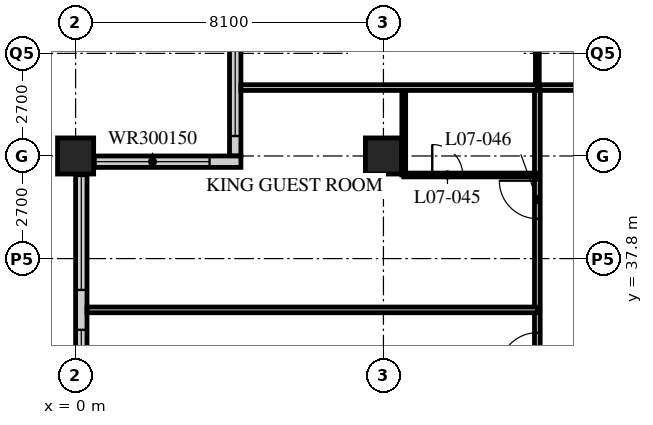
"""IFC4 building model, lengths in metres.
Left out: names, types, materials, properties, quantities, classifications, styles, units other than length and angle.
Written with IfcOpenShell. Run it as: python <this file> out.ifc"""

import sys

from ifc_helpers import new_model, si_unit, direction, frame, frame_2d, origin, origin_2d, place, context, subcontext, project, spatial, rectangle, hollow_rectangle, extrude, element, fill, save


model = new_model("IFC4")
c1 = context("Model", 3, precision=1e-05, world=origin(), true_north=direction((0.0, 1.0)))
c2 = subcontext(c1, "Body", "Model", "MODEL_VIEW")
j1 = project(units=[si_unit("LENGTHUNIT", "METRE"), si_unit("PLANEANGLEUNIT", "RADIAN")], contexts=[c1])
p1 = place(None, origin())
s1 = spatial("IfcSite", under=j1, at=p1, CompositionType="ELEMENT")
p2 = place(p1, origin())
s2 = spatial("IfcBuilding", under=s1, at=p2, CompositionType="ELEMENT")
p3 = place(p2, frame((0.0, 0.0, 36.4)))
s3 = spatial("IfcBuildingStorey", under=s2, at=p3, CompositionType="ELEMENT", Elevation=36.4)
for number, where, z_axis, x_axis in (
    (1, (0.0, 40.5, 0.0), (0.0, 0.0, 1.0), (1.0, 0.0, 0.0)),
    (2, (8.1, 40.5, 0.0), (0.0, 0.0, 1.0), (1.0, 0.0, 0.0)),
):
    element("IfcColumn", number, at=place(p3, frame(where, z_axis=z_axis, x_axis=x_axis)), inside=s3, PredefinedType="COLUMN", context=c2, shape_type="SweptSolid", body=[
        extrude(hollow_rectangle(XDim=0.95, YDim=0.95, WallThickness=0.095, at=origin_2d()), origin(), (0.0, 0.0, 1.0), 3.4),
    ])
p4 = place(p3, frame((4.2, 44.25, 0.0), z_axis=(0.0, 0.0, 1.0), x_axis=(0.0, -1.0, 0.0)))
e3 = element("IfcWall", 3, at=p4, inside=s3, PredefinedType="SOLIDWALL", context=c2, shape_type="SweptSolid", body=[
    extrude(rectangle(XDim=3.75, YDim=0.3, at=frame_2d((1.875, 0.0))), origin(), (0.0, 0.0, 1.0), 3.19),
])
p5 = place(p4, frame((0.225, 0.0, 0.9)))
e4 = element("IfcOpeningElement", 4, at=p5, cuts=e3, PredefinedType="OPENING", context=c2, shape_type="SweptSolid", body=[
    extrude(rectangle(XDim=3.0, YDim=1.5, at=frame_2d((1.5, 0.75))), frame((0.0, 0.16, 0.0), z_axis=(0.0, -1.0, 0.0), x_axis=(1.0, 0.0, 0.0)), (0.0, 0.0, 1.0), 0.32),
])
p6 = place(p3, frame((4.35, 40.35, 0.0), z_axis=(0.0, 0.0, 1.0), x_axis=(-1.0, 0.0, 0.0)))
e5 = element("IfcWall", 5, at=p6, inside=s3, PredefinedType="SOLIDWALL", context=c2, shape_type="SweptSolid", body=[
    extrude(rectangle(XDim=4.35, YDim=0.3, at=frame_2d((2.175, 0.0))), origin(), (0.0, 0.0, 1.0), 3.19),
])
p7 = place(p6, frame((0.825, 0.0, 0.9)))
e6 = element("IfcOpeningElement", 6, at=p7, cuts=e5, PredefinedType="OPENING", context=c2, shape_type="SweptSolid", body=[
    extrude(rectangle(XDim=3.0, YDim=1.5, at=frame_2d((1.5, 0.75))), frame((0.0, 0.16, 0.0), z_axis=(0.0, -1.0, 0.0), x_axis=(1.0, 0.0, 0.0)), (0.0, 0.0, 1.0), 0.32),
])
p8 = place(p3, frame((0.15, 40.2, 0.0), z_axis=(0.0, 0.0, 1.0), x_axis=(0.0, -1.0, 0.0)))
e7 = element("IfcWall", 7, at=p8, inside=s3, PredefinedType="SOLIDWALL", context=c2, shape_type="SweptSolid", body=[
    extrude(rectangle(XDim=32.1, YDim=0.3, at=frame_2d((16.05, 0.0))), origin(), (0.0, 0.0, 1.0), 3.19),
])
p9 = place(p8, frame((0.225, 0.0, 0.9)))
e8 = element("IfcOpeningElement", 8, at=p9, cuts=e7, PredefinedType="OPENING", context=c2, shape_type="SweptSolid", body=[
    extrude(rectangle(XDim=3.0, YDim=2.0, at=frame_2d((1.5, 1.0))), frame((0.0, 0.16, 0.0), z_axis=(0.0, -1.0, 0.0), x_axis=(1.0, 0.0, 0.0)), (0.0, 0.0, 1.0), 0.32),
])
p10 = place(p8, frame((4.275, 0.0, 0.9)))
e9 = element("IfcOpeningElement", 9, at=p10, cuts=e7, PredefinedType="OPENING", context=c2, shape_type="SweptSolid", body=[
    extrude(rectangle(XDim=3.0, YDim=2.0, at=frame_2d((1.5, 1.0))), frame((0.0, 0.16, 0.0), z_axis=(0.0, -1.0, 0.0), x_axis=(1.0, 0.0, 0.0)), (0.0, 0.0, 1.0), 0.32),
])
p11 = place(p8, frame((8.325, 0.0, 0.9)))
e10 = element("IfcOpeningElement", 10, at=p11, cuts=e7, PredefinedType="OPENING", context=c2, shape_type="SweptSolid", body=[
    extrude(rectangle(XDim=3.0, YDim=2.0, at=frame_2d((1.5, 1.0))), frame((0.0, 0.16, 0.0), z_axis=(0.0, -1.0, 0.0), x_axis=(1.0, 0.0, 0.0)), (0.0, 0.0, 1.0), 0.32),
])
p12 = place(p8, frame((12.375, 0.0, 0.9)))
e11 = element("IfcOpeningElement", 11, at=p12, cuts=e7, PredefinedType="OPENING", context=c2, shape_type="SweptSolid", body=[
    extrude(rectangle(XDim=3.0, YDim=2.0, at=frame_2d((1.5, 1.0))), frame((0.0, 0.16, 0.0), z_axis=(0.0, -1.0, 0.0), x_axis=(1.0, 0.0, 0.0)), (0.0, 0.0, 1.0), 0.32),
])
p13 = place(p8, frame((16.425, 0.0, 0.9)))
e12 = element("IfcOpeningElement", 12, at=p13, cuts=e7, PredefinedType="OPENING", context=c2, shape_type="SweptSolid", body=[
    extrude(rectangle(XDim=3.0, YDim=2.0, at=frame_2d((1.5, 1.0))), frame((0.0, 0.16, 0.0), z_axis=(0.0, -1.0, 0.0), x_axis=(1.0, 0.0, 0.0)), (0.0, 0.0, 1.0), 0.32),
])
p14 = place(p8, frame((20.475, 0.0, 0.9)))
e13 = element("IfcOpeningElement", 13, at=p14, cuts=e7, PredefinedType="OPENING", context=c2, shape_type="SweptSolid", body=[
    extrude(rectangle(XDim=3.0, YDim=2.0, at=frame_2d((1.5, 1.0))), frame((0.0, 0.16, 0.0), z_axis=(0.0, -1.0, 0.0), x_axis=(1.0, 0.0, 0.0)), (0.0, 0.0, 1.0), 0.32),
])
p15 = place(p8, frame((24.525, 0.0, 0.9)))
e14 = element("IfcOpeningElement", 14, at=p15, cuts=e7, PredefinedType="OPENING", context=c2, shape_type="SweptSolid", body=[
    extrude(rectangle(XDim=3.0, YDim=2.0, at=frame_2d((1.5, 1.0))), frame((0.0, 0.16, 0.0), z_axis=(0.0, -1.0, 0.0), x_axis=(1.0, 0.0, 0.0)), (0.0, 0.0, 1.0), 0.32),
])
p16 = place(p8, frame((28.575, 0.0, 0.9)))
e15 = element("IfcOpeningElement", 15, at=p16, cuts=e7, PredefinedType="OPENING", context=c2, shape_type="SweptSolid", body=[
    extrude(rectangle(XDim=3.0, YDim=2.0, at=frame_2d((1.5, 1.0))), frame((0.0, 0.16, 0.0), z_axis=(0.0, -1.0, 0.0), x_axis=(1.0, 0.0, 0.0)), (0.0, 0.0, 1.0), 0.32),
])
p17 = place(p3, frame((12.15, 42.3, 0.0), z_axis=(0.0, 0.0, 1.0), x_axis=(1.0, 0.0, 0.0)))
e16 = element("IfcWall", 16, at=p17, inside=s3, PredefinedType="PARTITIONING", context=c2, shape_type="SweptSolid", body=[
    extrude(rectangle(XDim=32.4, YDim=0.15, at=frame_2d((16.2, 0.0))), origin(), (0.0, 0.0, 1.0), 3.19),
])
p18 = place(p17, frame((6.5, 0.0, 0.0)))
e17 = element("IfcOpeningElement", 17, at=p18, cuts=e16, PredefinedType="OPENING", context=c2, shape_type="SweptSolid", body=[
    extrude(rectangle(XDim=1.0, YDim=2.1, at=frame_2d((0.5, 1.05))), frame((0.0, 0.085, 0.0), z_axis=(0.0, -1.0, 0.0), x_axis=(1.0, 0.0, 0.0)), (0.0, 0.0, 1.0), 0.17),
])
p19 = place(p17, frame((8.4, 0.0, 0.0)))
e18 = element("IfcOpeningElement", 18, at=p19, cuts=e16, PredefinedType="OPENING", context=c2, shape_type="SweptSolid", body=[
    extrude(rectangle(XDim=1.0, YDim=2.1, at=frame_2d((0.5, 1.05))), frame((0.0, 0.085, 0.0), z_axis=(0.0, -1.0, 0.0), x_axis=(1.0, 0.0, 0.0)), (0.0, 0.0, 1.0), 0.17),
])
p20 = place(p17, frame((14.6, 0.0, 0.0)))
e19 = element("IfcOpeningElement", 19, at=p20, cuts=e16, PredefinedType="OPENING", context=c2, shape_type="SweptSolid", body=[
    extrude(rectangle(XDim=1.0, YDim=2.1, at=frame_2d((0.5, 1.05))), frame((0.0, 0.085, 0.0), z_axis=(0.0, -1.0, 0.0), x_axis=(1.0, 0.0, 0.0)), (0.0, 0.0, 1.0), 0.17),
])
p21 = place(p17, frame((18.65, 0.0, 0.0)))
e20 = element("IfcOpeningElement", 20, at=p21, cuts=e16, PredefinedType="OPENING", context=c2, shape_type="SweptSolid", body=[
    extrude(rectangle(XDim=1.0, YDim=2.1, at=frame_2d((0.5, 1.05))), frame((0.0, 0.085, 0.0), z_axis=(0.0, -1.0, 0.0), x_axis=(1.0, 0.0, 0.0)), (0.0, 0.0, 1.0), 0.17),
])
p22 = place(p17, frame((23.0, 0.0, 0.0)))
e21 = element("IfcOpeningElement", 21, at=p22, cuts=e16, PredefinedType="OPENING", context=c2, shape_type="SweptSolid", body=[
    extrude(rectangle(XDim=1.0, YDim=2.1, at=frame_2d((0.5, 1.05))), frame((0.0, 0.085, 0.0), z_axis=(0.0, -1.0, 0.0), x_axis=(1.0, 0.0, 0.0)), (0.0, 0.0, 1.0), 0.17),
])
p23 = place(p17, frame((26.75, 0.0, 0.0)))
e22 = element("IfcOpeningElement", 22, at=p23, cuts=e16, PredefinedType="OPENING", context=c2, shape_type="SweptSolid", body=[
    extrude(rectangle(XDim=1.0, YDim=2.1, at=frame_2d((0.5, 1.05))), frame((0.0, 0.085, 0.0), z_axis=(0.0, -1.0, 0.0), x_axis=(1.0, 0.0, 0.0)), (0.0, 0.0, 1.0), 0.17),
])
p24 = place(p17, frame((28.775, 0.0, 0.0)))
e23 = element("IfcOpeningElement", 23, at=p24, cuts=e16, PredefinedType="OPENING", context=c2, shape_type="SweptSolid", body=[
    extrude(rectangle(XDim=1.0, YDim=2.1, at=frame_2d((0.5, 1.05))), frame((0.0, 0.085, 0.0), z_axis=(0.0, -1.0, 0.0), x_axis=(1.0, 0.0, 0.0)), (0.0, 0.0, 1.0), 0.17),
])
p25 = place(p17, frame((2.625, 0.0, 0.0)))
e24 = element("IfcOpeningElement", 24, at=p25, cuts=e16, PredefinedType="OPENING", context=c2, shape_type="SweptSolid", body=[
    extrude(rectangle(XDim=1.0, YDim=2.1, at=frame_2d((0.5, 1.05))), frame((0.0, 0.085, 0.0), z_axis=(0.0, -1.0, 0.0), x_axis=(1.0, 0.0, 0.0)), (0.0, 0.0, 1.0), 0.17),
])
p26 = place(p3, frame((12.15, 16.2, 0.0), z_axis=(0.0, 0.0, 1.0), x_axis=(0.0, 1.0, 0.0)))
e25 = element("IfcWall", 25, at=p26, inside=s3, PredefinedType="PARTITIONING", context=c2, shape_type="SweptSolid", body=[
    extrude(rectangle(XDim=26.1, YDim=0.15, at=frame_2d((13.05, 0.0))), origin(), (0.0, 0.0, 1.0), 3.19),
])
p27 = place(p26, frame((2.75, 0.0, 0.0)))
e26 = element("IfcOpeningElement", 26, at=p27, cuts=e25, PredefinedType="OPENING", context=c2, shape_type="SweptSolid", body=[
    extrude(rectangle(XDim=1.0, YDim=2.1, at=frame_2d((0.5, 1.05))), frame((0.0, 0.085, 0.0), z_axis=(0.0, -1.0, 0.0), x_axis=(1.0, 0.0, 0.0)), (0.0, 0.0, 1.0), 0.17),
])
p28 = place(p26, frame((4.35, 0.0, 0.0)))
e27 = element("IfcOpeningElement", 27, at=p28, cuts=e25, PredefinedType="OPENING", context=c2, shape_type="SweptSolid", body=[
    extrude(rectangle(XDim=1.0, YDim=2.1, at=frame_2d((0.5, 1.05))), frame((0.0, 0.085, 0.0), z_axis=(0.0, -1.0, 0.0), x_axis=(1.0, 0.0, 0.0)), (0.0, 0.0, 1.0), 0.17),
])
p29 = place(p26, frame((10.55, 0.0, 0.0)))
e28 = element("IfcOpeningElement", 28, at=p29, cuts=e25, PredefinedType="OPENING", context=c2, shape_type="SweptSolid", body=[
    extrude(rectangle(XDim=1.0, YDim=2.1, at=frame_2d((0.5, 1.05))), frame((0.0, 0.085, 0.0), z_axis=(0.0, -1.0, 0.0), x_axis=(1.0, 0.0, 0.0)), (0.0, 0.0, 1.0), 0.17),
])
p30 = place(p26, frame((12.45, 0.0, 0.0)))
e29 = element("IfcOpeningElement", 29, at=p30, cuts=e25, PredefinedType="OPENING", context=c2, shape_type="SweptSolid", body=[
    extrude(rectangle(XDim=1.0, YDim=2.1, at=frame_2d((0.5, 1.05))), frame((0.0, 0.085, 0.0), z_axis=(0.0, -1.0, 0.0), x_axis=(1.0, 0.0, 0.0)), (0.0, 0.0, 1.0), 0.17),
])
p31 = place(p26, frame((18.65, 0.0, 0.0)))
e30 = element("IfcOpeningElement", 30, at=p31, cuts=e25, PredefinedType="OPENING", context=c2, shape_type="SweptSolid", body=[
    extrude(rectangle(XDim=1.0, YDim=2.1, at=frame_2d((0.5, 1.05))), frame((0.0, 0.085, 0.0), z_axis=(0.0, -1.0, 0.0), x_axis=(1.0, 0.0, 0.0)), (0.0, 0.0, 1.0), 0.17),
])
p32 = place(p26, frame((22.65, 0.0, 0.0)))
e31 = element("IfcOpeningElement", 31, at=p32, cuts=e25, PredefinedType="OPENING", context=c2, shape_type="SweptSolid", body=[
    extrude(rectangle(XDim=1.0, YDim=2.1, at=frame_2d((0.5, 1.05))), frame((0.0, 0.085, 0.0), z_axis=(0.0, -1.0, 0.0), x_axis=(1.0, 0.0, 0.0)), (0.0, 0.0, 1.0), 0.17),
])
p33 = place(p3, frame((12.15, 36.45, 0.0), z_axis=(0.0, 0.0, 1.0), x_axis=(-1.0, 0.0, 0.0)))
e32 = element("IfcWall", 32, at=p33, inside=s3, PredefinedType="PARTITIONING", context=c2, shape_type="SweptSolid", body=[
    extrude(rectangle(XDim=11.85, YDim=0.15, at=frame_2d((5.925, 0.0))), origin(), (0.0, 0.0, 1.0), 3.19),
])
p34 = place(p3, frame((8.635, 40.0, 0.0), z_axis=(0.0, 0.0, 1.0), x_axis=(0.0, 1.0, 0.0)))
e33 = element("IfcWall", 33, at=p34, inside=s3, PredefinedType="PARTITIONING", context=c2, shape_type="SweptSolid", body=[
    extrude(rectangle(XDim=2.3, YDim=0.1, at=frame_2d((1.15, 0.0))), origin(), (0.0, 0.0, 1.0), 3.19),
])
p35 = place(p3, frame((12.15, 40.0, 0.0), z_axis=(0.0, 0.0, 1.0), x_axis=(-1.0, 0.0, 0.0)))
e34 = element("IfcWall", 34, at=p35, inside=s3, PredefinedType="PARTITIONING", context=c2, shape_type="SweptSolid", body=[
    extrude(rectangle(XDim=3.515, YDim=0.1, at=frame_2d((1.757, 0.0))), origin(), (0.0, 0.0, 1.0), 3.19),
])
p36 = place(p35, frame((1.965, 0.0, 0.0)))
e35 = element("IfcOpeningElement", 35, at=p36, cuts=e34, PredefinedType="OPENING", context=c2, shape_type="SweptSolid", body=[
    extrude(rectangle(XDim=0.8, YDim=2.1, at=frame_2d((0.4, 1.05))), frame((0.0, 0.06, 0.0), z_axis=(0.0, -1.0, 0.0), x_axis=(1.0, 0.0, 0.0)), (0.0, 0.0, 1.0), 0.12),
])
p37 = place(p3, frame((12.15, 42.3, 0.0), z_axis=(0.0, 0.0, 1.0), x_axis=(0.0, 1.0, 0.0)))
e36 = element("IfcWall", 36, at=p37, inside=s3, PredefinedType="PARTITIONING", context=c2, shape_type="SweptSolid", body=[
    extrude(rectangle(XDim=2.4, YDim=0.1, at=frame_2d((1.2, 0.0))), origin(), (0.0, 0.0, 1.0), 3.19),
])
p38 = place(p3, frame((4.35, 42.3, 0.0), z_axis=(0.0, 0.0, 1.0), x_axis=(1.0, 0.0, 0.0)))
e37 = element("IfcWall", 37, at=p38, inside=s3, PredefinedType="PARTITIONING", context=c2, shape_type="SweptSolid", body=[
    extrude(rectangle(XDim=7.8, YDim=0.15, at=frame_2d((3.9, 0.0))), origin(), (0.0, 0.0, 1.0), 3.19),
])
p39 = place(p5, origin())
e38 = element("IfcWindow", 38, at=p39, inside=s3, PartitioningType="SINGLE_PANEL", PredefinedType="WINDOW", context=c2, shape_type="SweptSolid", body=[
    extrude(rectangle(XDim=3.0, YDim=1.5, at=frame_2d((1.5, 0.75))), frame((0.0, 0.03, 0.0), z_axis=(0.0, -1.0, 0.0), x_axis=(1.0, 0.0, 0.0)), (0.0, 0.0, 1.0), 0.06),
])
fill(e4, e38)
p40 = place(p7, origin())
e39 = element("IfcWindow", 39, at=p40, inside=s3, PartitioningType="SINGLE_PANEL", PredefinedType="WINDOW", context=c2, shape_type="SweptSolid", body=[
    extrude(rectangle(XDim=3.0, YDim=1.5, at=frame_2d((1.5, 0.75))), frame((0.0, 0.03, 0.0), z_axis=(0.0, -1.0, 0.0), x_axis=(1.0, 0.0, 0.0)), (0.0, 0.0, 1.0), 0.06),
])
fill(e6, e39)
p41 = place(p9, origin())
e40 = element("IfcWindow", 40, at=p41, inside=s3, PartitioningType="SINGLE_PANEL", PredefinedType="WINDOW", context=c2, shape_type="SweptSolid", body=[
    extrude(rectangle(XDim=3.0, YDim=2.0, at=frame_2d((1.5, 1.0))), frame((0.0, 0.03, 0.0), z_axis=(0.0, -1.0, 0.0), x_axis=(1.0, 0.0, 0.0)), (0.0, 0.0, 1.0), 0.06),
])
fill(e8, e40)
p42 = place(p10, origin())
e41 = element("IfcWindow", 41, at=p42, inside=s3, PartitioningType="SINGLE_PANEL", PredefinedType="WINDOW", context=c2, shape_type="SweptSolid", body=[
    extrude(rectangle(XDim=3.0, YDim=2.0, at=frame_2d((1.5, 1.0))), frame((0.0, 0.03, 0.0), z_axis=(0.0, -1.0, 0.0), x_axis=(1.0, 0.0, 0.0)), (0.0, 0.0, 1.0), 0.06),
])
fill(e9, e41)
p43 = place(p31, origin())
e42 = element("IfcDoor", 42, at=p43, inside=s3, OperationType="SINGLE_SWING_LEFT", PredefinedType="DOOR", context=c2, shape_type="SweptSolid", body=[
    extrude(rectangle(XDim=1.0, YDim=2.1, at=frame_2d((0.5, 1.05))), frame((0.0, 0.025, 0.0), z_axis=(0.0, -1.0, 0.0), x_axis=(1.0, 0.0, 0.0)), (0.0, 0.0, 1.0), 0.05),
])
fill(e30, e42)
p44 = place(p36, origin())
e43 = element("IfcDoor", 43, at=p44, inside=s3, OperationType="SINGLE_SWING_LEFT", PredefinedType="DOOR", context=c2, shape_type="SweptSolid", body=[
    extrude(rectangle(XDim=0.8, YDim=2.1, at=frame_2d((0.4, 1.05))), frame((0.0, 0.025, 0.0), z_axis=(0.0, -1.0, 0.0), x_axis=(1.0, 0.0, 0.0)), (0.0, 0.0, 1.0), 0.05),
])
fill(e35, e43)
p45 = place(p32, origin())
e44 = element("IfcDoor", 44, at=p45, inside=s3, OperationType="SINGLE_SWING_RIGHT", PredefinedType="DOOR", context=c2, shape_type="SweptSolid", body=[
    extrude(rectangle(XDim=1.0, YDim=2.1, at=frame_2d((0.5, 1.05))), frame((0.0, 0.025, 0.0), z_axis=(0.0, -1.0, 0.0), x_axis=(1.0, 0.0, 0.0)), (0.0, 0.0, 1.0), 0.05),
])
fill(e31, e44)
save(model, sys.argv[1])
